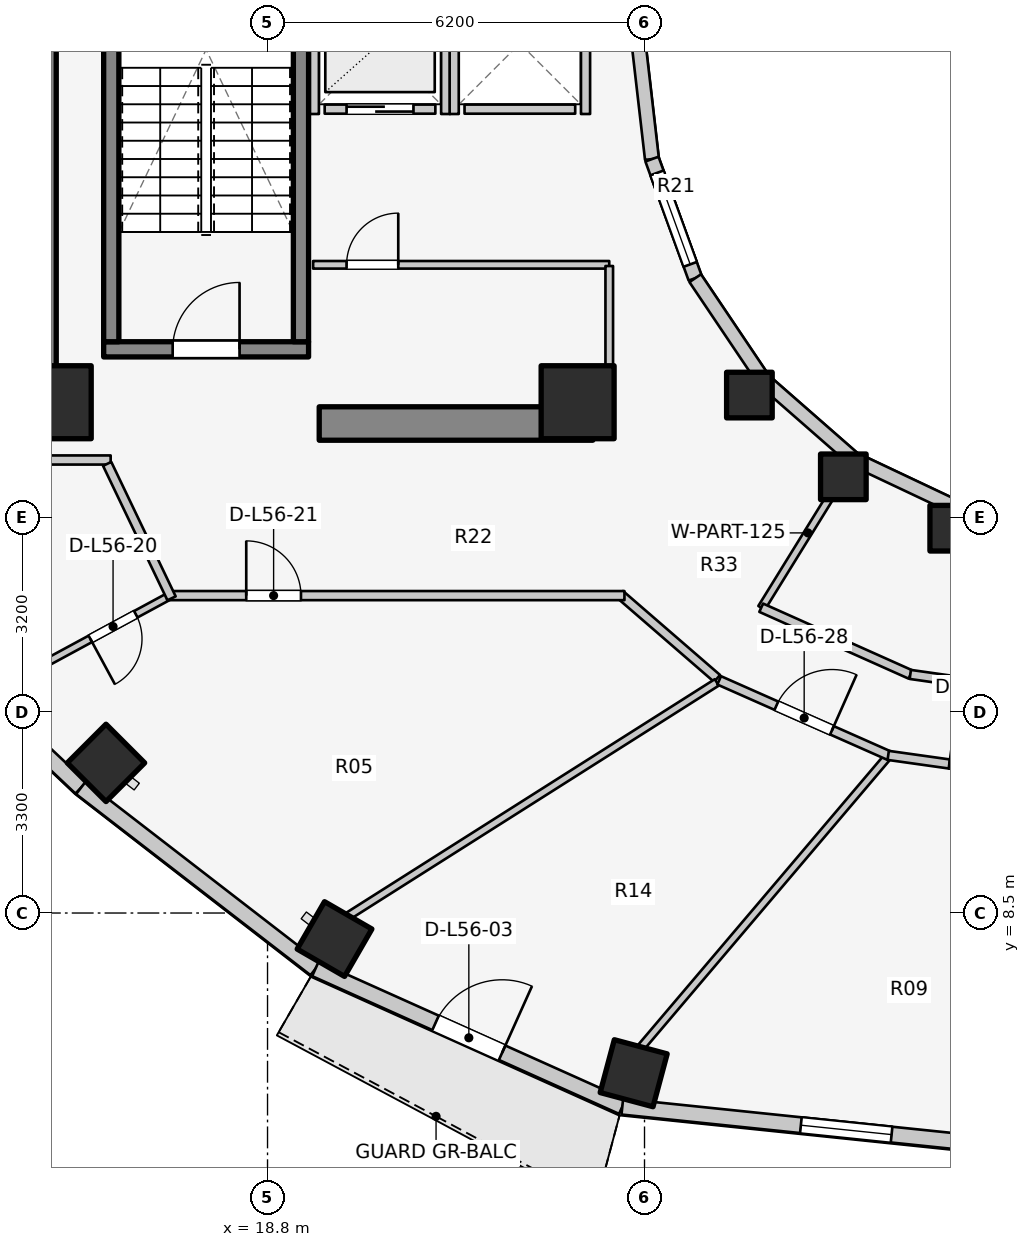
"""IFC4 building model, lengths in metres.
Left out: names, types, materials, properties, quantities, classifications, styles, units other than length and angle.
Written with IfcOpenShell. Run it as: python <this file> out.ifc"""

import sys

from ifc_helpers import new_model, si_unit, direction, frame, frame_2d, origin, origin_2d, place, context, subcontext, project, spatial, rectangle, extrude, element, fill, save


model = new_model("IFC4")
c1 = context("Model", 3, precision=1e-05, world=origin(), true_north=direction((0.0, 1.0)))
c2 = subcontext(c1, "Body", "Model", "MODEL_VIEW")
j1 = project(units=[si_unit("LENGTHUNIT", "METRE"), si_unit("PLANEANGLEUNIT", "RADIAN")], contexts=[c1])
p1 = place(None, origin())
s1 = spatial("IfcSite", under=j1, at=p1, CompositionType="ELEMENT")
p2 = place(p1, origin())
s2 = spatial("IfcBuilding", under=s1, at=p2, CompositionType="ELEMENT")
p3 = place(p2, frame((0.0, 0.0, 183.9)))
s3 = spatial("IfcBuildingStorey", under=s2, at=p3, CompositionType="ELEMENT", Elevation=183.9)
p4 = place(p3, frame((15.05, 17.05, 0.0), z_axis=(0.0, 0.0, 1.0), x_axis=(0.0, 1.0, 0.0)))
e1 = element("IfcWall", 1, at=p4, inside=s3, PredefinedType="SHEAR", context=c2, shape_type="SweptSolid", body=[
    extrude(rectangle(XDim=12.8, YDim=0.55, at=frame_2d((6.4, 0.0))), origin(), (0.0, 0.0, 1.0), 3.1),
])
p5 = place(p3, frame((19.65, 16.55, 0.0), z_axis=(0.0, 0.0, 1.0), x_axis=(1.0, 0.0, 0.0)))
e2 = element("IfcWall", 2, at=p5, inside=s3, PredefinedType="SHEAR", context=c2, shape_type="SweptSolid", body=[
    extrude(rectangle(XDim=4.5, YDim=0.55, at=frame_2d((2.25, 0.0))), origin(), (0.0, 0.0, 1.0), 3.1),
])
p6 = place(p3, frame((16.105, 17.77, 0.0), z_axis=(0.0, 0.0, 1.0), x_axis=(1.0, 0.0, 0.0)))
e3 = element("IfcWall", 3, at=p6, inside=s3, PredefinedType="SOLIDWALL", context=c2, shape_type="SweptSolid", body=[
    extrude(rectangle(XDim=3.37, YDim=0.25, at=frame_2d((1.685, 0.0))), origin(), (0.0, 0.0, 1.0), 3.1),
])
p7 = place(p6, frame((1.135, 0.0, 0.0)))
e4 = element("IfcOpeningElement", 4, at=p7, cuts=e3, PredefinedType="OPENING", context=c2, shape_type="SweptSolid", body=[
    extrude(rectangle(XDim=1.1, YDim=2.1, at=frame_2d((0.55, 1.05))), frame((0.0, 0.135, 0.0), z_axis=(0.0, -1.0, 0.0), x_axis=(1.0, 0.0, 0.0)), (0.0, 0.0, 1.0), 0.27),
])
for number, where, z_axis, x_axis in (
    (5, (16.23, 17.895, 0.0), (0.0, 0.0, 1.0), (0.0, 1.0, 0.0)),
    (6, (19.35, 17.895, 0.0), (0.0, 0.0, 1.0), (0.0, 1.0, 0.0)),
):
    element("IfcWall", number, at=place(p3, frame(where, z_axis=z_axis, x_axis=x_axis)), inside=s3, PredefinedType="SOLIDWALL", context=c2, shape_type="SweptSolid", body=[
        extrude(rectangle(XDim=7.81, YDim=0.25, at=frame_2d((3.905, 0.0))), origin(), (0.0, 0.0, 1.0), 3.1),
    ])
for number, where, z_axis, x_axis in (
    (7, (15.3, 16.9, 0.0), (0.0, 0.0, 1.0), (1.0, 0.0, 0.0)),
    (8, (23.9, 16.9, 0.0), (0.0, 0.0, 1.0), (1.0, 0.0, 0.0)),
):
    element("IfcColumn", number, at=place(p3, frame(where, z_axis=z_axis, x_axis=x_axis)), inside=s3, PredefinedType="COLUMN", context=c2, shape_type="SweptSolid", body=[
        extrude(rectangle(XDim=1.2, YDim=1.2, at=origin_2d()), origin(), (0.0, 0.0, 1.0), 3.1),
    ])
p8 = place(p3, frame((26.725, 17.018, 0.0), z_axis=(0.0, 0.0, 1.0), x_axis=(1.0, 0.0, 0.0)))
e9 = element("IfcColumn", 9, at=p8, inside=s3, PredefinedType="COLUMN", context=c2, shape_type="SweptSolid", body=[
    extrude(rectangle(XDim=0.75, YDim=0.75, at=origin_2d()), origin(), (0.0, 0.0, 1.0), 3.1),
])
p9 = place(p3, frame((16.143, 10.969, 0.0), z_axis=(0.0, 0.0, 1.0), x_axis=(-0.707106781187, -0.707106781187, 0.0)))
e10 = element("IfcColumn", 10, at=p9, inside=s3, PredefinedType="COLUMN", context=c2, shape_type="SweptSolid", body=[
    extrude(rectangle(XDim=0.9, YDim=0.9, at=origin_2d()), origin(), (0.0, 0.0, 1.0), 3.1),
])
p10 = place(p3, frame((28.27, 15.673, 0.0), z_axis=(0.0, 0.0, 1.0), x_axis=(1.0, 0.0, 0.0)))
e11 = element("IfcColumn", 11, at=p10, inside=s3, PredefinedType="COLUMN", context=c2, shape_type="SweptSolid", body=[
    extrude(rectangle(XDim=0.75, YDim=0.75, at=origin_2d()), origin(), (0.0, 0.0, 1.0), 3.1),
])
p11 = place(p3, frame((19.902, 8.072, 0.0), z_axis=(0.0, 0.0, 1.0), x_axis=(-0.5, -0.866025403784, 0.0)))
e12 = element("IfcColumn", 12, at=p11, inside=s3, PredefinedType="COLUMN", context=c2, shape_type="SweptSolid", body=[
    extrude(rectangle(XDim=0.9, YDim=0.9, at=origin_2d()), origin(), (0.0, 0.0, 1.0), 3.1),
])
p12 = place(p3, frame((30.069, 14.828, 0.0), z_axis=(0.0, 0.0, 1.0), x_axis=(1.0, 0.0, 0.0)))
e13 = element("IfcColumn", 13, at=p12, inside=s3, PredefinedType="COLUMN", context=c2, shape_type="SweptSolid", body=[
    extrude(rectangle(XDim=0.75, YDim=0.75, at=origin_2d()), origin(), (0.0, 0.0, 1.0), 3.1),
])
p13 = place(p3, frame((24.822, 5.865, 0.0), z_axis=(0.0, 0.0, 1.0), x_axis=(-0.258819045103, -0.965925826289, 0.0)))
e14 = element("IfcColumn", 14, at=p13, inside=s3, PredefinedType="COLUMN", context=c2, shape_type="SweptSolid", body=[
    extrude(rectangle(XDim=0.9, YDim=0.9, at=origin_2d()), origin(), (0.0, 0.0, 1.0), 3.1),
])
p14 = place(p3, frame((24.88, 23.0, 0.0), z_axis=(0.0, 0.0, 1.0), x_axis=(0.114711713601, -0.993398823617, 0.0)))
e15 = element("IfcWall", 15, at=p14, inside=s3, PredefinedType="STANDARD", context=c2, shape_type="SweptSolid", body=[
    extrude(rectangle(XDim=2.115, YDim=0.23, at=frame_2d((1.058, 0.0))), origin(), (0.0, 0.0, 1.0), 2.84),
])
p15 = place(p3, frame((25.123, 20.898, 0.0), z_axis=(0.0, 0.0, 1.0), x_axis=(0.341423187295, -0.93990968033, 0.0)))
e16 = element("IfcWall", 16, at=p15, inside=s3, PredefinedType="STANDARD", context=c2, shape_type="SweptSolid", body=[
    extrude(rectangle(XDim=2.084, YDim=0.23, at=frame_2d((1.042, 0.0))), origin(), (0.0, 0.0, 1.0), 2.84),
])
p16 = place(p15, frame((0.242, 0.0, 0.85)))
e17 = element("IfcOpeningElement", 17, at=p16, cuts=e16, PredefinedType="OPENING", context=c2, shape_type="SweptSolid", body=[
    extrude(rectangle(XDim=1.6, YDim=1.65, at=frame_2d((0.8, 0.825))), frame((0.0, 0.125, 0.0), z_axis=(0.0, -1.0, 0.0), x_axis=(1.0, 0.0, 0.0)), (0.0, 0.0, 1.0), 0.25),
])
p17 = place(p3, frame((25.834, 18.94, 0.0), z_axis=(0.0, 0.0, 1.0), x_axis=(0.558197800898, -0.829707909492, 0.0)))
e18 = element("IfcWall", 18, at=p17, inside=s3, PredefinedType="STANDARD", context=c2, shape_type="SweptSolid", body=[
    extrude(rectangle(XDim=2.027, YDim=0.23, at=frame_2d((1.013, 0.0))), origin(), (0.0, 0.0, 1.0), 2.16),
])
p18 = place(p3, frame((26.965, 17.258, 0.0), z_axis=(0.0, 0.0, 1.0), x_axis=(0.752576694707, -0.658504607869, 0.0)))
e19 = element("IfcWall", 19, at=p18, inside=s3, PredefinedType="STANDARD", context=c2, shape_type="SweptSolid", body=[
    extrude(rectangle(XDim=1.959, YDim=0.23, at=frame_2d((0.98, 0.0))), origin(), (0.0, 0.0, 1.0), 2.16),
])
p19 = place(p3, frame((28.44, 15.968, 0.0), z_axis=(0.0, 0.0, 1.0), x_axis=(0.904179699603, -0.427152280606, 0.0)))
e20 = element("IfcWall", 20, at=p19, inside=s3, PredefinedType="STANDARD", context=c2, shape_type="SweptSolid", body=[
    extrude(rectangle(XDim=1.899, YDim=0.23, at=frame_2d((0.95, 0.0))), origin(), (0.0, 0.0, 1.0), 2.16),
])
p20 = place(p3, frame((12.381, 13.716, 0.0), z_axis=(0.0, 0.0, 1.0), x_axis=(0.727667301037, -0.68593024354, 0.0)))
e21 = element("IfcWall", 21, at=p20, inside=s3, PredefinedType="STANDARD", context=c2, shape_type="SweptSolid", body=[
    extrude(rectangle(XDim=4.604, YDim=0.26, at=frame_2d((2.302, 0.0))), origin(), (0.0, 0.0, 1.0), 2.85),
])
p21 = place(p20, frame((0.631, 0.0, 0.75)))
e22 = element("IfcOpeningElement", 22, at=p21, cuts=e21, PredefinedType="OPENING", context=c2, shape_type="SweptSolid", body=[
    extrude(rectangle(XDim=1.2, YDim=1.5, at=frame_2d((0.6, 0.75))), frame((0.0, 0.14, 0.0), z_axis=(0.0, -1.0, 0.0), x_axis=(1.0, 0.0, 0.0)), (0.0, 0.0, 1.0), 0.28),
])
p22 = place(p3, frame((15.731, 10.559, 0.0), z_axis=(0.0, 0.0, 1.0), x_axis=(0.791460185804, -0.611220724687, 0.0)))
e23 = element("IfcWall", 23, at=p22, inside=s3, PredefinedType="STANDARD", context=c2, shape_type="SweptSolid", body=[
    extrude(rectangle(XDim=4.872, YDim=0.26, at=frame_2d((2.436, 0.0))), origin(), (0.0, 0.0, 1.0), 2.85),
])
p23 = place(p3, frame((19.587, 7.581, 0.0), z_axis=(0.0, 0.0, 1.0), x_axis=(0.912353637112, -0.409403029847, 0.0)))
e24 = element("IfcWall", 24, at=p23, inside=s3, PredefinedType="STANDARD", context=c2, shape_type="SweptSolid", body=[
    extrude(rectangle(XDim=5.533, YDim=0.26, at=frame_2d((2.766, 0.0))), origin(), (0.0, 0.0, 1.0), 2.88),
])
p24 = place(p23, frame((2.167, 0.0, 0.0)))
e25 = element("IfcOpeningElement", 25, at=p24, cuts=e24, PredefinedType="OPENING", context=c2, shape_type="SweptSolid", body=[
    extrude(rectangle(XDim=1.2, YDim=2.2, at=frame_2d((0.6, 1.1))), frame((0.0, 0.14, 0.0), z_axis=(0.0, -1.0, 0.0), x_axis=(1.0, 0.0, 0.0)), (0.0, 0.0, 1.0), 0.28),
])
p25 = place(p3, frame((24.635, 5.315, 0.0), z_axis=(0.0, 0.0, 1.0), x_axis=(0.994664178965, -0.10316574569, 0.0)))
e26 = element("IfcWall", 26, at=p25, inside=s3, PredefinedType="STANDARD", context=c2, shape_type="SweptSolid", body=[
    extrude(rectangle(XDim=7.405, YDim=0.26, at=frame_2d((3.702, 0.0))), origin(), (0.0, 0.0, 1.0), 2.85),
])
p26 = place(p25, frame((2.952, 0.0, 0.75)))
e27 = element("IfcOpeningElement", 27, at=p26, cuts=e26, PredefinedType="OPENING", context=c2, shape_type="SweptSolid", body=[
    extrude(rectangle(XDim=1.5, YDim=1.6, at=frame_2d((0.75, 0.8))), frame((0.0, 0.14, 0.0), z_axis=(0.0, -1.0, 0.0), x_axis=(1.0, 0.0, 0.0)), (0.0, 0.0, 1.0), 0.28),
])
p27 = place(p3, frame((19.74, 21.72, 0.0), z_axis=(0.0, 0.0, 1.0), x_axis=(1.0, 0.0, 0.0)))
e28 = element("IfcWall", 28, at=p27, inside=s3, PredefinedType="SOLIDWALL", context=c2, shape_type="SweptSolid", body=[
    extrude(rectangle(XDim=1.82, YDim=0.15, at=frame_2d((0.91, 0.0))), origin(), (0.0, 0.0, 1.0), 2.855),
])
p28 = place(p27, frame((0.36, 0.0, 0.0)))
e29 = element("IfcOpeningElement", 29, at=p28, cuts=e28, PredefinedType="OPENING", context=c2, shape_type="SweptSolid", body=[
    extrude(rectangle(XDim=1.1, YDim=2.1, at=frame_2d((0.55, 1.05))), frame((0.0, 0.085, 0.0), z_axis=(0.0, -1.0, 0.0), x_axis=(1.0, 0.0, 0.0)), (0.0, 0.0, 1.0), 0.17),
])
for number, where, z_axis, x_axis in (
    (30, (19.57, 21.64, 0.0), (0.0, 0.0, 1.0), (0.0, 1.0, 0.0)),
    (31, (21.73, 21.64, 0.0), (0.0, 0.0, 1.0), (0.0, 1.0, 0.0)),
):
    element("IfcWall", number, at=place(p3, frame(where, z_axis=z_axis, x_axis=x_axis)), inside=s3, PredefinedType="SOLIDWALL", context=c2, shape_type="SweptSolid", body=[
        extrude(rectangle(XDim=2.32, YDim=0.15, at=frame_2d((1.16, 0.0))), origin(), (0.0, 0.0, 1.0), 2.855),
    ])
p29 = place(p3, frame((22.04, 21.72, 0.0), z_axis=(0.0, 0.0, 1.0), x_axis=(1.0, 0.0, 0.0)))
e32 = element("IfcWall", 32, at=p29, inside=s3, PredefinedType="SOLIDWALL", context=c2, shape_type="SweptSolid", body=[
    extrude(rectangle(XDim=1.82, YDim=0.15, at=frame_2d((0.91, 0.0))), origin(), (0.0, 0.0, 1.0), 2.12),
])
p30 = place(p3, frame((21.87, 21.64, 0.0), z_axis=(0.0, 0.0, 1.0), x_axis=(0.0, 1.0, 0.0)))
e33 = element("IfcWall", 33, at=p30, inside=s3, PredefinedType="SOLIDWALL", context=c2, shape_type="SweptSolid", body=[
    extrude(rectangle(XDim=2.32, YDim=0.15, at=frame_2d((1.16, 0.0))), origin(), (0.0, 0.0, 1.0), 2.855),
])
p31 = place(p3, frame((24.03, 21.64, 0.0), z_axis=(0.0, 0.0, 1.0), x_axis=(0.0, 1.0, 0.0)))
e34 = element("IfcWall", 34, at=p31, inside=s3, PredefinedType="SOLIDWALL", context=c2, shape_type="SweptSolid", body=[
    extrude(rectangle(XDim=2.32, YDim=0.15, at=frame_2d((1.16, 0.0))), origin(), (0.0, 0.0, 1.0), 2.12),
])
p32 = place(p3, frame((19.55, 19.16, 0.0), z_axis=(0.0, 0.0, 1.0), x_axis=(1.0, 0.0, 0.0)))
e35 = element("IfcWall", 35, at=p32, inside=s3, PredefinedType="PARTITIONING", context=c2, shape_type="SweptSolid", body=[
    extrude(rectangle(XDim=4.87, YDim=0.125, at=frame_2d((2.435, 0.0))), origin(), (0.0, 0.0, 1.0), 2.12),
])
p33 = place(p32, frame((0.55, 0.0, 0.0)))
e36 = element("IfcOpeningElement", 36, at=p33, cuts=e35, PredefinedType="OPENING", context=c2, shape_type="SweptSolid", body=[
    extrude(rectangle(XDim=0.85, YDim=2.05, at=frame_2d((0.425, 1.025))), frame((0.0, 0.073, 0.0), z_axis=(0.0, -1.0, 0.0), x_axis=(1.0, 0.0, 0.0)), (0.0, 0.0, 1.0), 0.145),
])
p34 = place(p3, frame((24.42, 17.1, 0.0), z_axis=(0.0, 0.0, 1.0), x_axis=(0.0, 1.0, 0.0)))
e37 = element("IfcWall", 37, at=p34, inside=s3, PredefinedType="PARTITIONING", context=c2, shape_type="SweptSolid", body=[
    extrude(rectangle(XDim=2.04, YDim=0.125, at=frame_2d((1.02, 0.0))), origin(), (0.0, 0.0, 1.0), 2.232),
])
p35 = place(p3, frame((10.96, 15.95, 0.0), z_axis=(0.0, 0.0, 1.0), x_axis=(1.0, 0.0, 0.0)))
e38 = element("IfcWall", 38, at=p35, inside=s3, PredefinedType="PARTITIONING", context=c2, shape_type="SweptSolid", body=[
    extrude(rectangle(XDim=5.26, YDim=0.15, at=frame_2d((2.63, 0.0))), origin(), (0.0, 0.0, 1.0), 2.22),
])
p36 = place(p3, frame((17.244, 13.744, 0.0), z_axis=(0.0, 0.0, 1.0), x_axis=(-0.879385297668, -0.476110804587, 0.0)))
e39 = element("IfcWall", 39, at=p36, inside=s3, PredefinedType="MOVABLE", context=c2, shape_type="SweptSolid", body=[
    extrude(rectangle(XDim=3.56, YDim=0.12, at=frame_2d((1.78, 0.0))), origin(), (0.0, 0.0, 1.0), 2.22),
])
p37 = place(p36, frame((0.694, 0.0, 0.0)))
e40 = element("IfcOpeningElement", 40, at=p37, cuts=e39, PredefinedType="OPENING", context=c2, shape_type="SweptSolid", body=[
    extrude(rectangle(XDim=0.85, YDim=2.05, at=frame_2d((0.425, 1.025))), frame((0.0, 0.07, 0.0), z_axis=(0.0, -1.0, 0.0), x_axis=(1.0, 0.0, 0.0)), (0.0, 0.0, 1.0), 0.14),
])
p38 = place(p3, frame((26.193, 12.358, 0.0), z_axis=(0.0, 0.0, 1.0), x_axis=(-0.756055312247, 0.654507727092, 0.0)))
e41 = element("IfcWall", 41, at=p38, inside=s3, PredefinedType="PARTITIONING", context=c2, shape_type="SweptSolid", body=[
    extrude(rectangle(XDim=2.111, YDim=0.15, at=frame_2d((1.055, 0.0))), origin(), (0.0, 0.0, 1.0), 2.299),
])
p39 = place(p3, frame((17.15, 13.72, 0.0), z_axis=(0.0, 0.0, 1.0), x_axis=(1.0, 0.0, 0.0)))
e42 = element("IfcWall", 42, at=p39, inside=s3, PredefinedType="PARTITIONING", context=c2, shape_type="SweptSolid", body=[
    extrude(rectangle(XDim=7.52, YDim=0.15, at=frame_2d((3.76, 0.0))), origin(), (0.0, 0.0, 1.0), 2.299),
])
p40 = place(p39, frame((1.3, 0.0, 0.0)))
e43 = element("IfcOpeningElement", 43, at=p40, cuts=e42, PredefinedType="OPENING", context=c2, shape_type="SweptSolid", body=[
    extrude(rectangle(XDim=0.9, YDim=2.1, at=frame_2d((0.45, 1.05))), frame((0.0, 0.085, 0.0), z_axis=(0.0, -1.0, 0.0), x_axis=(1.0, 0.0, 0.0)), (0.0, 0.0, 1.0), 0.17),
])
p41 = place(p3, frame((17.222, 13.675, 0.0), z_axis=(0.0, 0.0, 1.0), x_axis=(-0.431973389813, 0.901886351207, 0.0)))
e44 = element("IfcWall", 44, at=p41, inside=s3, PredefinedType="PARTITIONING", context=c2, shape_type="SweptSolid", body=[
    extrude(rectangle(XDim=2.452, YDim=0.15, at=frame_2d((1.226, 0.0))), origin(), (0.0, 0.0, 1.0), 2.855),
])
p42 = place(p3, frame((28.45, 15.985, 0.0), z_axis=(0.0, 0.0, 1.0), x_axis=(-0.525627246902, -0.850714991824, 0.0)))
e45 = element("IfcWall", 45, at=p42, inside=s3, PredefinedType="PARTITIONING", context=c2, shape_type="SweptSolid", body=[
    extrude(rectangle(XDim=2.901, YDim=0.125, at=frame_2d((1.451, 0.0))), origin(), (0.0, 0.0, 1.0), 2.299),
])
p43 = place(p3, frame((26.919, 13.521, 0.0), z_axis=(0.0, 0.0, 1.0), x_axis=(0.912888568324, -0.408208845842, 0.0)))
e46 = element("IfcWall", 46, at=p43, inside=s3, PredefinedType="PARTITIONING", context=c2, shape_type="SweptSolid", body=[
    extrude(rectangle(XDim=2.69, YDim=0.15, at=frame_2d((1.345, 0.0))), origin(), (0.0, 0.0, 1.0), 2.299),
])
p44 = place(p3, frame((29.371, 12.424, 0.0), z_axis=(0.0, 0.0, 1.0), x_axis=(0.990066775667, -0.1405979364, 0.0)))
e47 = element("IfcWall", 47, at=p44, inside=s3, PredefinedType="PARTITIONING", context=c2, shape_type="SweptSolid", body=[
    extrude(rectangle(XDim=2.657, YDim=0.15, at=frame_2d((1.328, 0.0))), origin(), (0.0, 0.0, 1.0), 2.299),
])
p45 = place(p3, frame((26.188, 12.292, 0.0), z_axis=(0.0, 0.0, 1.0), x_axis=(-0.844640430122, -0.535334048799, 0.0)))
e48 = element("IfcWall", 48, at=p45, inside=s3, PredefinedType="PARTITIONING", context=c2, shape_type="SweptSolid", body=[
    extrude(rectangle(XDim=7.188, YDim=0.125, at=frame_2d((3.594, 0.0))), origin(), (0.0, 0.0, 1.0), 2.299),
])
p46 = place(p3, frame((28.98, 11.048, 0.0), z_axis=(0.0, 0.0, 1.0), x_axis=(-0.647173462792, -0.762342776615, 0.0)))
e49 = element("IfcWall", 49, at=p46, inside=s3, PredefinedType="PARTITIONING", context=c2, shape_type="SweptSolid", body=[
    extrude(rectangle(XDim=6.253, YDim=0.125, at=frame_2d((3.127, 0.0))), origin(), (0.0, 0.0, 1.0), 2.299),
])
p47 = place(p3, frame((26.228, 12.326, 0.0), z_axis=(0.0, 0.0, 1.0), x_axis=(0.914324470734, -0.404982422108, 0.0)))
e50 = element("IfcWall", 50, at=p47, inside=s3, PredefinedType="PARTITIONING", context=c2, shape_type="SweptSolid", body=[
    extrude(rectangle(XDim=3.058, YDim=0.15, at=frame_2d((1.529, 0.0))), origin(), (0.0, 0.0, 1.0), 2.299),
])
p48 = place(p47, frame((1.029, 0.0, 0.0)))
e51 = element("IfcOpeningElement", 51, at=p48, cuts=e50, PredefinedType="OPENING", context=c2, shape_type="SweptSolid", body=[
    extrude(rectangle(XDim=1.0, YDim=2.1, at=frame_2d((0.5, 1.05))), frame((0.0, 0.085, 0.0), z_axis=(0.0, -1.0, 0.0), x_axis=(1.0, 0.0, 0.0)), (0.0, 0.0, 1.0), 0.17),
])
p49 = place(p3, frame((29.008, 11.092, 0.0), z_axis=(0.0, 0.0, 1.0), x_axis=(0.990234341072, -0.139412875167, 0.0)))
e52 = element("IfcWall", 52, at=p49, inside=s3, PredefinedType="PARTITIONING", context=c2, shape_type="SweptSolid", body=[
    extrude(rectangle(XDim=3.03, YDim=0.15, at=frame_2d((1.515, 0.0))), origin(), (0.0, 0.0, 1.0), 2.299),
])
p50 = place(p49, frame((1.015, 0.0, 0.0)))
e53 = element("IfcOpeningElement", 53, at=p50, cuts=e52, PredefinedType="OPENING", context=c2, shape_type="SweptSolid", body=[
    extrude(rectangle(XDim=1.0, YDim=2.1, at=frame_2d((0.5, 1.05))), frame((0.0, 0.085, 0.0), z_axis=(0.0, -1.0, 0.0), x_axis=(1.0, 0.0, 0.0)), (0.0, 0.0, 1.0), 0.17),
])
p51 = place(p16, origin())
e54 = element("IfcWindow", 54, at=p51, inside=s3, PartitioningType="SINGLE_PANEL", PredefinedType="WINDOW", context=c2, shape_type="SweptSolid", body=[
    extrude(rectangle(XDim=1.6, YDim=1.65, at=frame_2d((0.8, 0.825))), frame((0.0, 0.03, 0.0), z_axis=(0.0, -1.0, 0.0), x_axis=(1.0, 0.0, 0.0)), (0.0, 0.0, 1.0), 0.06),
])
fill(e17, e54)
p52 = place(p24, origin())
e55 = element("IfcDoor", 55, at=p52, inside=s3, OperationType="SINGLE_SWING_RIGHT", PredefinedType="DOOR", context=c2, shape_type="SweptSolid", body=[
    extrude(rectangle(XDim=1.2, YDim=2.2, at=frame_2d((0.6, 1.1))), frame((0.0, 0.025, 0.0), z_axis=(0.0, -1.0, 0.0), x_axis=(1.0, 0.0, 0.0)), (0.0, 0.0, 1.0), 0.05),
])
fill(e25, e55)
p53 = place(p26, origin())
e56 = element("IfcWindow", 56, at=p53, inside=s3, PartitioningType="SINGLE_PANEL", PredefinedType="WINDOW", context=c2, shape_type="SweptSolid", body=[
    extrude(rectangle(XDim=1.5, YDim=1.6, at=frame_2d((0.75, 0.8))), frame((0.0, 0.03, 0.0), z_axis=(0.0, -1.0, 0.0), x_axis=(1.0, 0.0, 0.0)), (0.0, 0.0, 1.0), 0.06),
])
fill(e27, e56)
p54 = place(p7, origin())
e57 = element("IfcDoor", 57, at=p54, inside=s3, OperationType="SINGLE_SWING_RIGHT", PredefinedType="DOOR", context=c2, shape_type="SweptSolid", body=[
    extrude(rectangle(XDim=1.1, YDim=2.1, at=frame_2d((0.55, 1.05))), frame((0.0, 0.025, 0.0), z_axis=(0.0, -1.0, 0.0), x_axis=(1.0, 0.0, 0.0)), (0.0, 0.0, 1.0), 0.05),
])
fill(e4, e57)
p55 = place(p28, origin())
e58 = element("IfcDoor", 58, at=p55, inside=s3, OperationType="DOUBLE_DOOR_SLIDING", PredefinedType="DOOR", context=c2, shape_type="SweptSolid", body=[
    extrude(rectangle(XDim=1.1, YDim=2.1, at=frame_2d((0.55, 1.05))), frame((0.0, 0.025, 0.0), z_axis=(0.0, -1.0, 0.0), x_axis=(1.0, 0.0, 0.0)), (0.0, 0.0, 1.0), 0.05),
])
fill(e29, e58)
p56 = place(p33, origin())
e59 = element("IfcDoor", 59, at=p56, inside=s3, OperationType="SINGLE_SWING_RIGHT", PredefinedType="DOOR", context=c2, shape_type="SweptSolid", body=[
    extrude(rectangle(XDim=0.85, YDim=2.05, at=frame_2d((0.425, 1.025))), frame((0.0, 0.025, 0.0), z_axis=(0.0, -1.0, 0.0), x_axis=(1.0, 0.0, 0.0)), (0.0, 0.0, 1.0), 0.05),
])
fill(e36, e59)
p57 = place(p37, origin())
e60 = element("IfcDoor", 60, at=p57, inside=s3, OperationType="SINGLE_SWING_RIGHT", PredefinedType="DOOR", context=c2, shape_type="SweptSolid", body=[
    extrude(rectangle(XDim=0.85, YDim=2.05, at=frame_2d((0.425, 1.025))), frame((0.0, 0.025, 0.0), z_axis=(0.0, -1.0, 0.0), x_axis=(1.0, 0.0, 0.0)), (0.0, 0.0, 1.0), 0.05),
])
fill(e40, e60)
p58 = place(p40, origin())
e61 = element("IfcDoor", 61, at=p58, inside=s3, OperationType="SINGLE_SWING_LEFT", PredefinedType="DOOR", context=c2, shape_type="SweptSolid", body=[
    extrude(rectangle(XDim=0.9, YDim=2.1, at=frame_2d((0.45, 1.05))), frame((0.0, 0.025, 0.0), z_axis=(0.0, -1.0, 0.0), x_axis=(1.0, 0.0, 0.0)), (0.0, 0.0, 1.0), 0.05),
])
fill(e43, e61)
p59 = place(p48, origin())
e62 = element("IfcDoor", 62, at=p59, inside=s3, OperationType="SINGLE_SWING_RIGHT", PredefinedType="DOOR", context=c2, shape_type="SweptSolid", body=[
    extrude(rectangle(XDim=1.0, YDim=2.1, at=frame_2d((0.5, 1.05))), frame((0.0, 0.025, 0.0), z_axis=(0.0, -1.0, 0.0), x_axis=(1.0, 0.0, 0.0)), (0.0, 0.0, 1.0), 0.05),
])
fill(e51, e62)
p60 = place(p50, origin())
e63 = element("IfcDoor", 63, at=p60, inside=s3, OperationType="SINGLE_SWING_LEFT", PredefinedType="DOOR", context=c2, shape_type="SweptSolid", body=[
    extrude(rectangle(XDim=1.0, YDim=2.1, at=frame_2d((0.5, 1.05))), frame((0.0, 0.025, 0.0), z_axis=(0.0, -1.0, 0.0), x_axis=(1.0, 0.0, 0.0)), (0.0, 0.0, 1.0), 0.05),
])
fill(e53, e63)
save(model, sys.argv[1])
